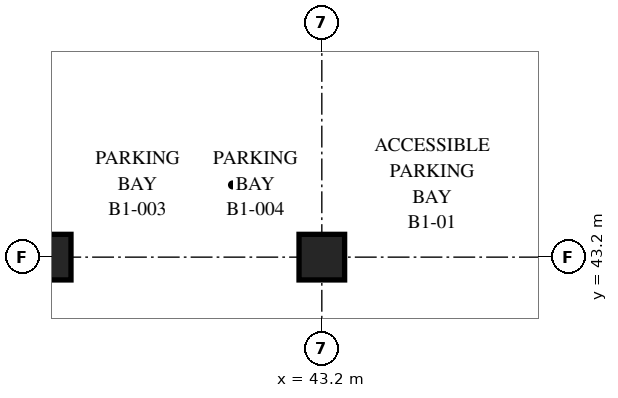
"""IFC4 building model, lengths in metres.
Left out: names, types, materials, properties, quantities, classifications, styles, units other than length and angle.
Written with IfcOpenShell. Run it as: python <this file> out.ifc"""

import sys

from ifc_helpers import new_model, si_unit, direction, frame, origin, origin_2d, place, context, subcontext, project, spatial, rectangle, extrude, element, save


model = new_model("IFC4")
c1 = context("Model", 3, precision=1e-05, world=origin(), true_north=direction((0.0, 1.0)))
c2 = subcontext(c1, "Body", "Model", "MODEL_VIEW")
j1 = project(units=[si_unit("LENGTHUNIT", "METRE"), si_unit("PLANEANGLEUNIT", "RADIAN")], contexts=[c1])
p1 = place(None, origin())
s1 = spatial("IfcSite", under=j1, at=p1, CompositionType="ELEMENT")
p2 = place(p1, origin())
s2 = spatial("IfcBuilding", under=s1, at=p2, CompositionType="ELEMENT")
p3 = place(p2, frame((0.0, 0.0, -4.5)))
s3 = spatial("IfcBuildingStorey", under=s2, at=p3, CompositionType="ELEMENT", Elevation=-4.5)
for number, where, z_axis, x_axis in (
    (1, (36.0, 43.2, 0.0), (0.0, 0.0, 1.0), (1.0, 0.0, 0.0)),
    (2, (43.2, 43.2, 0.0), (0.0, 0.0, 1.0), (1.0, 0.0, 0.0)),
):
    element("IfcColumn", number, at=place(p3, frame(where, z_axis=z_axis, x_axis=x_axis)), inside=s3, PredefinedType="COLUMN", context=c2, shape_type="SweptSolid", body=[
        extrude(rectangle(XDim=1.2, YDim=1.2, at=origin_2d()), origin(), (0.0, 0.0, 1.0), 4.1),
    ])
save(model, sys.argv[1])
